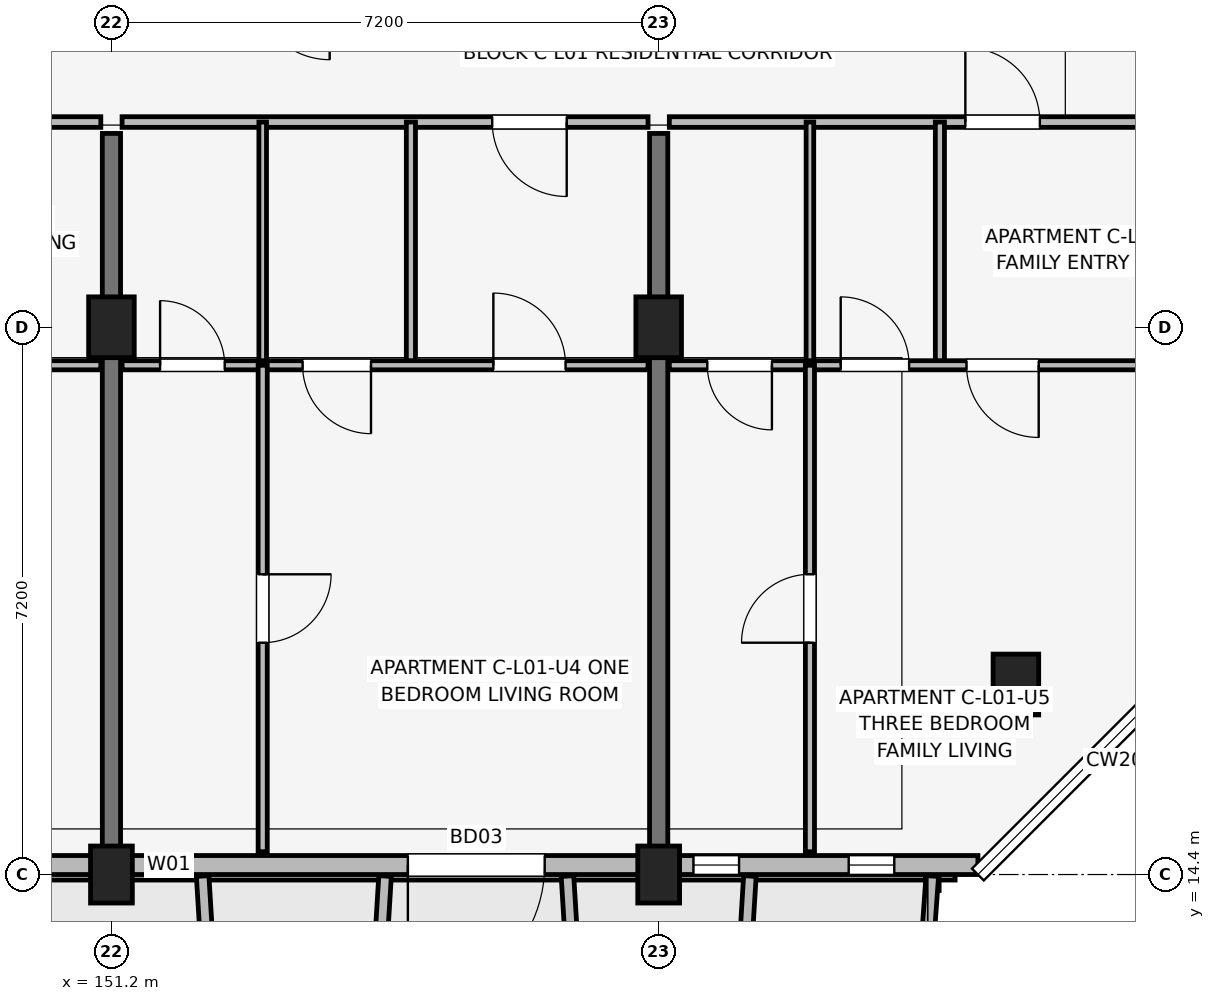
"""IFC4 building model, lengths in metres.
Left out: names, types, materials, properties, quantities, classifications, styles, units other than length and angle.
Written with IfcOpenShell. Run it as: python <this file> out.ifc"""

import sys

from ifc_helpers import new_model, si_unit, direction, frame, frame_2d, origin, origin_2d, place, context, subcontext, project, spatial, rectangle, extrude, element, fill, save


model = new_model("IFC4")
c1 = context("Model", 3, precision=1e-05, world=origin(), true_north=direction((0.0, 1.0)))
c2 = subcontext(c1, "Body", "Model", "MODEL_VIEW")
j1 = project(units=[si_unit("LENGTHUNIT", "METRE"), si_unit("PLANEANGLEUNIT", "RADIAN")], contexts=[c1])
p1 = place(None, origin())
s1 = spatial("IfcSite", under=j1, at=p1, CompositionType="ELEMENT")
p2 = place(p1, origin())
s2 = spatial("IfcBuilding", under=s1, at=p2, CompositionType="ELEMENT")
p3 = place(p2, frame((0.0, 0.0, 4.5)))
s3 = spatial("IfcBuildingStorey", under=s2, at=p3, CompositionType="ELEMENT", Elevation=4.5)
p4 = place(p3, frame((151.2, 14.4, 0.0), z_axis=(0.0, 0.0, 1.0), x_axis=(1.0, 0.0, 0.0)))
e1 = element("IfcColumn", 1, at=p4, inside=s3, PredefinedType="COLUMN", context=c2, shape_type="SweptSolid", body=[
    extrude(rectangle(XDim=0.55, YDim=0.75, at=origin_2d()), origin(), (0.0, 0.0, 1.0), 4.2),
])
p5 = place(p3, frame((151.2, 21.6, 0.0), z_axis=(0.0, 0.0, 1.0), x_axis=(1.0, 0.0, 0.0)))
e2 = element("IfcColumn", 2, at=p5, inside=s3, PredefinedType="COLUMN", context=c2, shape_type="SweptSolid", body=[
    extrude(rectangle(XDim=0.6, YDim=0.8, at=origin_2d()), origin(), (0.0, 0.0, 1.0), 4.2),
])
p6 = place(p3, frame((158.4, 14.4, 0.0), z_axis=(0.0, 0.0, 1.0), x_axis=(1.0, 0.0, 0.0)))
e3 = element("IfcColumn", 3, at=p6, inside=s3, PredefinedType="COLUMN", context=c2, shape_type="SweptSolid", body=[
    extrude(rectangle(XDim=0.55, YDim=0.75, at=origin_2d()), origin(), (0.0, 0.0, 1.0), 4.2),
])
for number, where, z_axis, x_axis in (
    (4, (158.4, 21.6, 0.0), (0.0, 0.0, 1.0), (1.0, 0.0, 0.0)),
    (5, (163.1, 16.9, 0.0), (0.0, 0.0, 1.0), (1.0, 0.0, 0.0)),
):
    element("IfcColumn", number, at=place(p3, frame(where, z_axis=z_axis, x_axis=x_axis)), inside=s3, PredefinedType="COLUMN", context=c2, shape_type="SweptSolid", body=[
        extrude(rectangle(XDim=0.6, YDim=0.8, at=origin_2d()), origin(), (0.0, 0.0, 1.0), 4.2),
    ])
for number, where, z_axis, x_axis in (
    (6, (151.2, 14.75, 0.0), (0.0, 0.0, 1.0), (0.0, 1.0, 0.0)),
    (7, (158.4, 14.75, 0.0), (0.0, 0.0, 1.0), (0.0, 1.0, 0.0)),
):
    element("IfcWall", number, at=place(p3, frame(where, z_axis=z_axis, x_axis=x_axis)), inside=s3, PredefinedType="SHEAR", context=c2, shape_type="SweptSolid", body=[
        extrude(rectangle(XDim=9.4, YDim=0.24, at=frame_2d((4.7, 0.0))), origin(), (0.0, 0.0, 1.0), 4.2),
    ])
p7 = place(p3, frame((132.6, 14.525, 0.0), z_axis=(0.0, 0.0, 1.0), x_axis=(1.0, 0.0, 0.0)))
e8 = element("IfcWall", 8, at=p7, inside=s3, PredefinedType="SOLIDWALL", context=c2, shape_type="SweptSolid", body=[
    extrude(rectangle(XDim=30.0, YDim=0.25, at=frame_2d((15.0, 0.0))), origin(), (0.0, 0.0, 1.0), 3.48),
])
p8 = place(p7, frame((9.75, 0.0, 0.0), z_axis=(0.0, 0.0, 1.0), x_axis=(-1.0, 0.0, 0.0)))
e9 = element("IfcOpeningElement", 9, at=p8, cuts=e8, PredefinedType="OPENING", context=c2, shape_type="SweptSolid", body=[
    extrude(rectangle(XDim=1.5, YDim=2.15, at=frame_2d((0.75, 1.075))), frame((0.0, 0.135, 0.0), z_axis=(0.0, -1.0, 0.0), x_axis=(1.0, 0.0, 0.0)), (0.0, 0.0, 1.0), 0.27),
])
p9 = place(p7, frame((24.3, 0.0, 0.0), z_axis=(0.0, 0.0, 1.0), x_axis=(-1.0, 0.0, 0.0)))
e10 = element("IfcOpeningElement", 10, at=p9, cuts=e8, PredefinedType="OPENING", context=c2, shape_type="SweptSolid", body=[
    extrude(rectangle(XDim=1.8, YDim=2.15, at=frame_2d((0.9, 1.075))), frame((0.0, 0.135, 0.0), z_axis=(0.0, -1.0, 0.0), x_axis=(1.0, 0.0, 0.0)), (0.0, 0.0, 1.0), 0.27),
])
p10 = place(p7, frame((0.8, 0.0, 0.7)))
e11 = element("IfcOpeningElement", 11, at=p10, cuts=e8, PredefinedType="OPENING", context=c2, shape_type="SweptSolid", body=[
    extrude(rectangle(XDim=2.0, YDim=1.65, at=frame_2d((1.0, 0.825))), frame((0.0, 0.135, 0.0), z_axis=(0.0, -1.0, 0.0), x_axis=(1.0, 0.0, 0.0)), (0.0, 0.0, 1.0), 0.27),
])
p11 = place(p7, frame((12.725, 0.0, 0.7)))
e12 = element("IfcOpeningElement", 12, at=p11, cuts=e8, PredefinedType="OPENING", context=c2, shape_type="SweptSolid", body=[
    extrude(rectangle(XDim=2.15, YDim=1.65, at=frame_2d((1.075, 0.825))), frame((0.0, 0.135, 0.0), z_axis=(0.0, -1.0, 0.0), x_axis=(1.0, 0.0, 0.0)), (0.0, 0.0, 1.0), 0.27),
])
p12 = place(p7, frame((15.915, 0.0, 0.75)))
e13 = element("IfcOpeningElement", 13, at=p12, cuts=e8, PredefinedType="OPENING", context=c2, shape_type="SweptSolid", body=[
    extrude(rectangle(XDim=1.22, YDim=1.5, at=frame_2d((0.61, 0.75))), frame((0.0, 0.135, 0.0), z_axis=(0.0, -1.0, 0.0), x_axis=(1.0, 0.0, 0.0)), (0.0, 0.0, 1.0), 0.27),
])
p13 = place(p7, frame((19.058, 0.0, 0.75)))
e14 = element("IfcOpeningElement", 14, at=p13, cuts=e8, PredefinedType="OPENING", context=c2, shape_type="SweptSolid", body=[
    extrude(rectangle(XDim=0.6, YDim=1.25, at=frame_2d((0.3, 0.625))), frame((0.0, 0.135, 0.0), z_axis=(0.0, -1.0, 0.0), x_axis=(1.0, 0.0, 0.0)), (0.0, 0.0, 1.0), 0.27),
])
p14 = place(p7, frame((26.258, 0.0, 0.75)))
e15 = element("IfcOpeningElement", 15, at=p14, cuts=e8, PredefinedType="OPENING", context=c2, shape_type="SweptSolid", body=[
    extrude(rectangle(XDim=0.6, YDim=1.25, at=frame_2d((0.3, 0.625))), frame((0.0, 0.135, 0.0), z_axis=(0.0, -1.0, 0.0), x_axis=(1.0, 0.0, 0.0)), (0.0, 0.0, 1.0), 0.27),
])
p15 = place(p7, frame((28.3, 0.0, 0.75)))
e16 = element("IfcOpeningElement", 16, at=p15, cuts=e8, PredefinedType="OPENING", context=c2, shape_type="SweptSolid", body=[
    extrude(rectangle(XDim=0.6, YDim=1.25, at=frame_2d((0.3, 0.625))), frame((0.0, 0.135, 0.0), z_axis=(0.0, -1.0, 0.0), x_axis=(1.0, 0.0, 0.0)), (0.0, 0.0, 1.0), 0.27),
])
for number, where, z_axis, x_axis in (
    (17, (152.4, 14.38, 0.0), (0.0, 0.0, 1.0), (0.061, -0.998, 0.0)),
    (18, (154.8, 14.38, 0.0), (0.0, 0.0, 1.0), (-0.061, -0.998, 0.0)),
    (19, (157.2, 14.38, 0.0), (0.0, 0.0, 1.0), (0.061, -0.998, 0.0)),
):
    element("IfcWall", number, at=place(p3, frame(where, z_axis=z_axis, x_axis=x_axis)), inside=s3, PredefinedType="ELEMENTEDWALL", context=c2, shape_type="SweptSolid", body=[
        extrude(rectangle(XDim=1.964, YDim=0.165, at=frame_2d((0.982, 0.0))), origin(), (0.0, 0.0, 1.0), 3.58),
    ])
p16 = place(p3, frame((159.6, 14.38, 0.0), z_axis=(0.0, 0.0, 1.0), x_axis=(-0.061170732449, -0.998127317276, 0.0)))
e20 = element("IfcWall", 20, at=p16, inside=s3, PredefinedType="ELEMENTEDWALL", context=c2, shape_type="SweptSolid", body=[
    extrude(rectangle(XDim=1.964, YDim=0.165, at=frame_2d((0.982, 0.0))), origin(), (0.0, 0.0, 1.0), 4.0),
])
p17 = place(p3, frame((162.0, 14.38, 0.0), z_axis=(0.0, 0.0, 1.0), x_axis=(-0.071194071069, -0.997462482625, 0.0)))
e21 = element("IfcWall", 21, at=p17, inside=s3, PredefinedType="ELEMENTEDWALL", context=c2, shape_type="SweptSolid", body=[
    extrude(rectangle(XDim=1.965, YDim=0.165, at=frame_2d((0.982, 0.0))), origin(), (0.0, 0.0, 1.0), 4.0),
])
p18 = place(p3, frame((144.14, 24.3, 0.0), z_axis=(0.0, 0.0, 1.0), x_axis=(1.0, 0.0, 0.0)))
e22 = element("IfcWall", 22, at=p18, inside=s3, PredefinedType="PARTITIONING", context=c2, shape_type="SweptSolid", body=[
    extrude(rectangle(XDim=6.92, YDim=0.14, at=frame_2d((3.46, 0.0))), origin(), (0.0, 0.0, 1.0), 3.25),
])
p19 = place(p18, frame((5.02, 0.0, 0.0)))
e23 = element("IfcOpeningElement", 23, at=p19, cuts=e22, PredefinedType="OPENING", context=c2, shape_type="SweptSolid", body=[
    extrude(rectangle(XDim=0.98, YDim=2.1, at=frame_2d((0.49, 1.05))), frame((0.0, 0.08, 0.0), z_axis=(0.0, -1.0, 0.0), x_axis=(1.0, 0.0, 0.0)), (0.0, 0.0, 1.0), 0.16),
])
p20 = place(p3, frame((144.14, 21.1, 0.0), z_axis=(0.0, 0.0, 1.0), x_axis=(1.0, 0.0, 0.0)))
e24 = element("IfcWall", 24, at=p20, inside=s3, PredefinedType="PARTITIONING", context=c2, shape_type="SweptSolid", body=[
    extrude(rectangle(XDim=6.92, YDim=0.12, at=frame_2d((3.46, 0.0))), origin(), (0.0, 0.0, 1.0), 3.25),
])
p21 = place(p20, frame((1.35, 0.0, 0.0), z_axis=(0.0, 0.0, 1.0), x_axis=(-1.0, 0.0, 0.0)))
e25 = element("IfcOpeningElement", 25, at=p21, cuts=e24, PredefinedType="OPENING", context=c2, shape_type="SweptSolid", body=[
    extrude(rectangle(XDim=0.85, YDim=2.08, at=frame_2d((0.425, 1.04))), frame((0.0, 0.07, 0.0), z_axis=(0.0, -1.0, 0.0), x_axis=(1.0, 0.0, 0.0)), (0.0, 0.0, 1.0), 0.14),
])
p22 = place(p20, frame((2.525, 0.0, 0.0)))
e26 = element("IfcOpeningElement", 26, at=p22, cuts=e24, PredefinedType="OPENING", context=c2, shape_type="SweptSolid", body=[
    extrude(rectangle(XDim=0.9, YDim=2.08, at=frame_2d((0.45, 1.04))), frame((0.0, 0.07, 0.0), z_axis=(0.0, -1.0, 0.0), x_axis=(1.0, 0.0, 0.0)), (0.0, 0.0, 1.0), 0.14),
])
p23 = place(p20, frame((5.985, 0.0, 0.0), z_axis=(0.0, 0.0, 1.0), x_axis=(-1.0, 0.0, 0.0)))
e27 = element("IfcOpeningElement", 27, at=p23, cuts=e24, PredefinedType="OPENING", context=c2, shape_type="SweptSolid", body=[
    extrude(rectangle(XDim=0.95, YDim=2.08, at=frame_2d((0.475, 1.04))), frame((0.0, 0.07, 0.0), z_axis=(0.0, -1.0, 0.0), x_axis=(1.0, 0.0, 0.0)), (0.0, 0.0, 1.0), 0.14),
])
p24 = place(p3, frame((151.34, 24.3, 0.0), z_axis=(0.0, 0.0, 1.0), x_axis=(1.0, 0.0, 0.0)))
e28 = element("IfcWall", 28, at=p24, inside=s3, PredefinedType="PARTITIONING", context=c2, shape_type="SweptSolid", body=[
    extrude(rectangle(XDim=6.92, YDim=0.14, at=frame_2d((3.46, 0.0))), origin(), (0.0, 0.0, 1.0), 3.25),
])
p25 = place(p24, frame((5.85, 0.0, 0.0), z_axis=(0.0, 0.0, 1.0), x_axis=(-1.0, 0.0, 0.0)))
e29 = element("IfcOpeningElement", 29, at=p25, cuts=e28, PredefinedType="OPENING", context=c2, shape_type="SweptSolid", body=[
    extrude(rectangle(XDim=0.98, YDim=2.1, at=frame_2d((0.49, 1.05))), frame((0.0, 0.08, 0.0), z_axis=(0.0, -1.0, 0.0), x_axis=(1.0, 0.0, 0.0)), (0.0, 0.0, 1.0), 0.16),
])
p26 = place(p3, frame((153.19, 21.1, 0.0), z_axis=(0.0, 0.0, 1.0), x_axis=(0.0, 1.0, 0.0)))
e30 = element("IfcWall", 30, at=p26, inside=s3, PredefinedType="PARTITIONING", context=c2, shape_type="SweptSolid", body=[
    extrude(rectangle(XDim=3.2, YDim=0.1, at=frame_2d((1.6, 0.0))), origin(), (0.0, 0.0, 1.0), 3.25),
])
p27 = place(p3, frame((155.14, 21.1, 0.0), z_axis=(0.0, 0.0, 1.0), x_axis=(0.0, 1.0, 0.0)))
e31 = element("IfcWall", 31, at=p27, inside=s3, PredefinedType="PARTITIONING", context=c2, shape_type="SweptSolid", body=[
    extrude(rectangle(XDim=3.2, YDim=0.12, at=frame_2d((1.6, 0.0))), origin(), (0.0, 0.0, 1.0), 3.25),
])
p28 = place(p3, frame((151.34, 21.1, 0.0), z_axis=(0.0, 0.0, 1.0), x_axis=(1.0, 0.0, 0.0)))
e32 = element("IfcWall", 32, at=p28, inside=s3, PredefinedType="PARTITIONING", context=c2, shape_type="SweptSolid", body=[
    extrude(rectangle(XDim=6.92, YDim=0.12, at=frame_2d((3.46, 0.0))), origin(), (0.0, 0.0, 1.0), 3.25),
])
p29 = place(p28, frame((0.5, 0.0, 0.0)))
e33 = element("IfcOpeningElement", 33, at=p29, cuts=e32, PredefinedType="OPENING", context=c2, shape_type="SweptSolid", body=[
    extrude(rectangle(XDim=0.85, YDim=2.08, at=frame_2d((0.425, 1.04))), frame((0.0, 0.07, 0.0), z_axis=(0.0, -1.0, 0.0), x_axis=(1.0, 0.0, 0.0)), (0.0, 0.0, 1.0), 0.14),
])
p30 = place(p28, frame((3.275, 0.0, 0.0), z_axis=(0.0, 0.0, 1.0), x_axis=(-1.0, 0.0, 0.0)))
e34 = element("IfcOpeningElement", 34, at=p30, cuts=e32, PredefinedType="OPENING", context=c2, shape_type="SweptSolid", body=[
    extrude(rectangle(XDim=0.9, YDim=2.08, at=frame_2d((0.45, 1.04))), frame((0.0, 0.07, 0.0), z_axis=(0.0, -1.0, 0.0), x_axis=(1.0, 0.0, 0.0)), (0.0, 0.0, 1.0), 0.14),
])
p31 = place(p28, frame((4.885, 0.0, 0.0)))
e35 = element("IfcOpeningElement", 35, at=p31, cuts=e32, PredefinedType="OPENING", context=c2, shape_type="SweptSolid", body=[
    extrude(rectangle(XDim=0.95, YDim=2.08, at=frame_2d((0.475, 1.04))), frame((0.0, 0.07, 0.0), z_axis=(0.0, -1.0, 0.0), x_axis=(1.0, 0.0, 0.0)), (0.0, 0.0, 1.0), 0.14),
])
p32 = place(p3, frame((153.19, 14.7, 0.0), z_axis=(0.0, 0.0, 1.0), x_axis=(0.0, 1.0, 0.0)))
e36 = element("IfcWall", 36, at=p32, inside=s3, PredefinedType="PARTITIONING", context=c2, shape_type="SweptSolid", body=[
    extrude(rectangle(XDim=6.4, YDim=0.12, at=frame_2d((3.2, 0.0))), origin(), (0.0, 0.0, 1.0), 3.25),
])
p33 = place(p32, frame((3.65, 0.0, 0.0), z_axis=(0.0, 0.0, 1.0), x_axis=(-1.0, 0.0, 0.0)))
e37 = element("IfcOpeningElement", 37, at=p33, cuts=e36, PredefinedType="OPENING", context=c2, shape_type="SweptSolid", body=[
    extrude(rectangle(XDim=0.9, YDim=2.08, at=frame_2d((0.45, 1.04))), frame((0.0, 0.07, 0.0), z_axis=(0.0, -1.0, 0.0), x_axis=(1.0, 0.0, 0.0)), (0.0, 0.0, 1.0), 0.14),
])
p34 = place(p3, frame((158.54, 24.3, 0.0), z_axis=(0.0, 0.0, 1.0), x_axis=(1.0, 0.0, 0.0)))
e38 = element("IfcWall", 38, at=p34, inside=s3, PredefinedType="PARTITIONING", context=c2, shape_type="SweptSolid", body=[
    extrude(rectangle(XDim=6.92, YDim=0.14, at=frame_2d((3.46, 0.0))), origin(), (0.0, 0.0, 1.0), 3.25),
])
p35 = place(p34, frame((3.895, 0.0, 0.0)))
e39 = element("IfcOpeningElement", 39, at=p35, cuts=e38, PredefinedType="OPENING", context=c2, shape_type="SweptSolid", body=[
    extrude(rectangle(XDim=0.98, YDim=2.1, at=frame_2d((0.49, 1.05))), frame((0.0, 0.08, 0.0), z_axis=(0.0, -1.0, 0.0), x_axis=(1.0, 0.0, 0.0)), (0.0, 0.0, 1.0), 0.16),
])
p36 = place(p3, frame((160.39, 21.1, 0.0), z_axis=(0.0, 0.0, 1.0), x_axis=(0.0, 1.0, 0.0)))
e40 = element("IfcWall", 40, at=p36, inside=s3, PredefinedType="PARTITIONING", context=c2, shape_type="SweptSolid", body=[
    extrude(rectangle(XDim=3.2, YDim=0.1, at=frame_2d((1.6, 0.0))), origin(), (0.0, 0.0, 1.0), 3.25),
])
p37 = place(p3, frame((162.1, 21.1, 0.0), z_axis=(0.0, 0.0, 1.0), x_axis=(0.0, 1.0, 0.0)))
e41 = element("IfcWall", 41, at=p37, inside=s3, PredefinedType="PARTITIONING", context=c2, shape_type="SweptSolid", body=[
    extrude(rectangle(XDim=3.2, YDim=0.12, at=frame_2d((1.6, 0.0))), origin(), (0.0, 0.0, 1.0), 3.25),
])
p38 = place(p3, frame((158.54, 21.1, 0.0), z_axis=(0.0, 0.0, 1.0), x_axis=(1.0, 0.0, 0.0)))
e42 = element("IfcWall", 42, at=p38, inside=s3, PredefinedType="PARTITIONING", context=c2, shape_type="SweptSolid", body=[
    extrude(rectangle(XDim=6.92, YDim=0.12, at=frame_2d((3.46, 0.0))), origin(), (0.0, 0.0, 1.0), 3.25),
])
p39 = place(p38, frame((1.35, 0.0, 0.0), z_axis=(0.0, 0.0, 1.0), x_axis=(-1.0, 0.0, 0.0)))
e43 = element("IfcOpeningElement", 43, at=p39, cuts=e42, PredefinedType="OPENING", context=c2, shape_type="SweptSolid", body=[
    extrude(rectangle(XDim=0.85, YDim=2.08, at=frame_2d((0.425, 1.04))), frame((0.0, 0.07, 0.0), z_axis=(0.0, -1.0, 0.0), x_axis=(1.0, 0.0, 0.0)), (0.0, 0.0, 1.0), 0.14),
])
p40 = place(p38, frame((2.255, 0.0, 0.0)))
e44 = element("IfcOpeningElement", 44, at=p40, cuts=e42, PredefinedType="OPENING", context=c2, shape_type="SweptSolid", body=[
    extrude(rectangle(XDim=0.9, YDim=2.08, at=frame_2d((0.45, 1.04))), frame((0.0, 0.07, 0.0), z_axis=(0.0, -1.0, 0.0), x_axis=(1.0, 0.0, 0.0)), (0.0, 0.0, 1.0), 0.14),
])
p41 = place(p38, frame((4.86, 0.0, 0.0), z_axis=(0.0, 0.0, 1.0), x_axis=(-1.0, 0.0, 0.0)))
e45 = element("IfcOpeningElement", 45, at=p41, cuts=e42, PredefinedType="OPENING", context=c2, shape_type="SweptSolid", body=[
    extrude(rectangle(XDim=0.95, YDim=2.08, at=frame_2d((0.475, 1.04))), frame((0.0, 0.07, 0.0), z_axis=(0.0, -1.0, 0.0), x_axis=(1.0, 0.0, 0.0)), (0.0, 0.0, 1.0), 0.14),
])
p42 = place(p3, frame((160.39, 14.7, 0.0), z_axis=(0.0, 0.0, 1.0), x_axis=(0.0, 1.0, 0.0)))
e46 = element("IfcWall", 46, at=p42, inside=s3, PredefinedType="PARTITIONING", context=c2, shape_type="SweptSolid", body=[
    extrude(rectangle(XDim=6.4, YDim=0.12, at=frame_2d((3.2, 0.0))), origin(), (0.0, 0.0, 1.0), 3.25),
])
p43 = place(p42, frame((2.75, 0.0, 0.0)))
e47 = element("IfcOpeningElement", 47, at=p43, cuts=e46, PredefinedType="OPENING", context=c2, shape_type="SweptSolid", body=[
    extrude(rectangle(XDim=0.9, YDim=2.08, at=frame_2d((0.45, 1.04))), frame((0.0, 0.07, 0.0), z_axis=(0.0, -1.0, 0.0), x_axis=(1.0, 0.0, 0.0)), (0.0, 0.0, 1.0), 0.14),
])
p44 = place(p9, origin())
e48 = element("IfcDoor", 48, at=p44, inside=s3, OperationType="SINGLE_SWING_LEFT", PredefinedType="DOOR", context=c2, shape_type="SweptSolid", body=[
    extrude(rectangle(XDim=1.8, YDim=2.15, at=frame_2d((0.9, 1.075))), frame((0.0, 0.025, 0.0), z_axis=(0.0, -1.0, 0.0), x_axis=(1.0, 0.0, 0.0)), (0.0, 0.0, 1.0), 0.05),
])
fill(e10, e48)
p45 = place(p13, origin())
e49 = element("IfcWindow", 49, at=p45, inside=s3, PartitioningType="SINGLE_PANEL", PredefinedType="WINDOW", context=c2, shape_type="SweptSolid", body=[
    extrude(rectangle(XDim=0.6, YDim=1.25, at=frame_2d((0.3, 0.625))), frame((0.0, 0.03, 0.0), z_axis=(0.0, -1.0, 0.0), x_axis=(1.0, 0.0, 0.0)), (0.0, 0.0, 1.0), 0.06),
])
fill(e14, e49)
p46 = place(p14, origin())
e50 = element("IfcWindow", 50, at=p46, inside=s3, PartitioningType="SINGLE_PANEL", PredefinedType="WINDOW", context=c2, shape_type="SweptSolid", body=[
    extrude(rectangle(XDim=0.6, YDim=1.25, at=frame_2d((0.3, 0.625))), frame((0.0, 0.03, 0.0), z_axis=(0.0, -1.0, 0.0), x_axis=(1.0, 0.0, 0.0)), (0.0, 0.0, 1.0), 0.06),
])
fill(e15, e50)
p47 = place(p15, origin())
e51 = element("IfcWindow", 51, at=p47, inside=s3, PartitioningType="SINGLE_PANEL", PredefinedType="WINDOW", context=c2, shape_type="SweptSolid", body=[
    extrude(rectangle(XDim=0.6, YDim=1.25, at=frame_2d((0.3, 0.625))), frame((0.0, 0.03, 0.0), z_axis=(0.0, -1.0, 0.0), x_axis=(1.0, 0.0, 0.0)), (0.0, 0.0, 1.0), 0.06),
])
fill(e16, e51)
p48 = place(p25, origin())
e52 = element("IfcDoor", 52, at=p48, inside=s3, OperationType="SINGLE_SWING_RIGHT", PredefinedType="DOOR", context=c2, shape_type="SweptSolid", body=[
    extrude(rectangle(XDim=0.98, YDim=2.1, at=frame_2d((0.49, 1.05))), frame((0.0, 0.025, 0.0), z_axis=(0.0, -1.0, 0.0), x_axis=(1.0, 0.0, 0.0)), (0.0, 0.0, 1.0), 0.05),
])
fill(e29, e52)
p49 = place(p29, origin())
e53 = element("IfcDoor", 53, at=p49, inside=s3, OperationType="SINGLE_SWING_LEFT", PredefinedType="DOOR", context=c2, shape_type="SweptSolid", body=[
    extrude(rectangle(XDim=0.85, YDim=2.08, at=frame_2d((0.425, 1.04))), frame((0.0, 0.025, 0.0), z_axis=(0.0, -1.0, 0.0), x_axis=(1.0, 0.0, 0.0)), (0.0, 0.0, 1.0), 0.05),
])
fill(e33, e53)
p50 = place(p30, origin())
e54 = element("IfcDoor", 54, at=p50, inside=s3, OperationType="SINGLE_SWING_RIGHT", PredefinedType="DOOR", context=c2, shape_type="SweptSolid", body=[
    extrude(rectangle(XDim=0.9, YDim=2.08, at=frame_2d((0.45, 1.04))), frame((0.0, 0.025, 0.0), z_axis=(0.0, -1.0, 0.0), x_axis=(1.0, 0.0, 0.0)), (0.0, 0.0, 1.0), 0.05),
])
fill(e34, e54)
p51 = place(p31, origin())
e55 = element("IfcDoor", 55, at=p51, inside=s3, OperationType="SINGLE_SWING_LEFT", PredefinedType="DOOR", context=c2, shape_type="SweptSolid", body=[
    extrude(rectangle(XDim=0.95, YDim=2.08, at=frame_2d((0.475, 1.04))), frame((0.0, 0.025, 0.0), z_axis=(0.0, -1.0, 0.0), x_axis=(1.0, 0.0, 0.0)), (0.0, 0.0, 1.0), 0.05),
])
fill(e35, e55)
p52 = place(p33, origin())
e56 = element("IfcDoor", 56, at=p52, inside=s3, OperationType="SINGLE_SWING_RIGHT", PredefinedType="DOOR", context=c2, shape_type="SweptSolid", body=[
    extrude(rectangle(XDim=0.9, YDim=2.08, at=frame_2d((0.45, 1.04))), frame((0.0, 0.025, 0.0), z_axis=(0.0, -1.0, 0.0), x_axis=(1.0, 0.0, 0.0)), (0.0, 0.0, 1.0), 0.05),
])
fill(e37, e56)
p53 = place(p35, origin())
e57 = element("IfcDoor", 57, at=p53, inside=s3, OperationType="SINGLE_SWING_LEFT", PredefinedType="DOOR", context=c2, shape_type="SweptSolid", body=[
    extrude(rectangle(XDim=0.98, YDim=2.1, at=frame_2d((0.49, 1.05))), frame((0.0, 0.025, 0.0), z_axis=(0.0, -1.0, 0.0), x_axis=(1.0, 0.0, 0.0)), (0.0, 0.0, 1.0), 0.05),
])
fill(e39, e57)
p54 = place(p39, origin())
e58 = element("IfcDoor", 58, at=p54, inside=s3, OperationType="SINGLE_SWING_RIGHT", PredefinedType="DOOR", context=c2, shape_type="SweptSolid", body=[
    extrude(rectangle(XDim=0.85, YDim=2.08, at=frame_2d((0.425, 1.04))), frame((0.0, 0.025, 0.0), z_axis=(0.0, -1.0, 0.0), x_axis=(1.0, 0.0, 0.0)), (0.0, 0.0, 1.0), 0.05),
])
fill(e43, e58)
p55 = place(p40, origin())
e59 = element("IfcDoor", 59, at=p55, inside=s3, OperationType="SINGLE_SWING_LEFT", PredefinedType="DOOR", context=c2, shape_type="SweptSolid", body=[
    extrude(rectangle(XDim=0.9, YDim=2.08, at=frame_2d((0.45, 1.04))), frame((0.0, 0.025, 0.0), z_axis=(0.0, -1.0, 0.0), x_axis=(1.0, 0.0, 0.0)), (0.0, 0.0, 1.0), 0.05),
])
fill(e44, e59)
p56 = place(p41, origin())
e60 = element("IfcDoor", 60, at=p56, inside=s3, OperationType="SINGLE_SWING_RIGHT", PredefinedType="DOOR", context=c2, shape_type="SweptSolid", body=[
    extrude(rectangle(XDim=0.95, YDim=2.08, at=frame_2d((0.475, 1.04))), frame((0.0, 0.025, 0.0), z_axis=(0.0, -1.0, 0.0), x_axis=(1.0, 0.0, 0.0)), (0.0, 0.0, 1.0), 0.05),
])
fill(e45, e60)
p57 = place(p43, origin())
e61 = element("IfcDoor", 61, at=p57, inside=s3, OperationType="SINGLE_SWING_LEFT", PredefinedType="DOOR", context=c2, shape_type="SweptSolid", body=[
    extrude(rectangle(XDim=0.9, YDim=2.08, at=frame_2d((0.45, 1.04))), frame((0.0, 0.025, 0.0), z_axis=(0.0, -1.0, 0.0), x_axis=(1.0, 0.0, 0.0)), (0.0, 0.0, 1.0), 0.05),
])
fill(e47, e61)
save(model, sys.argv[1])
